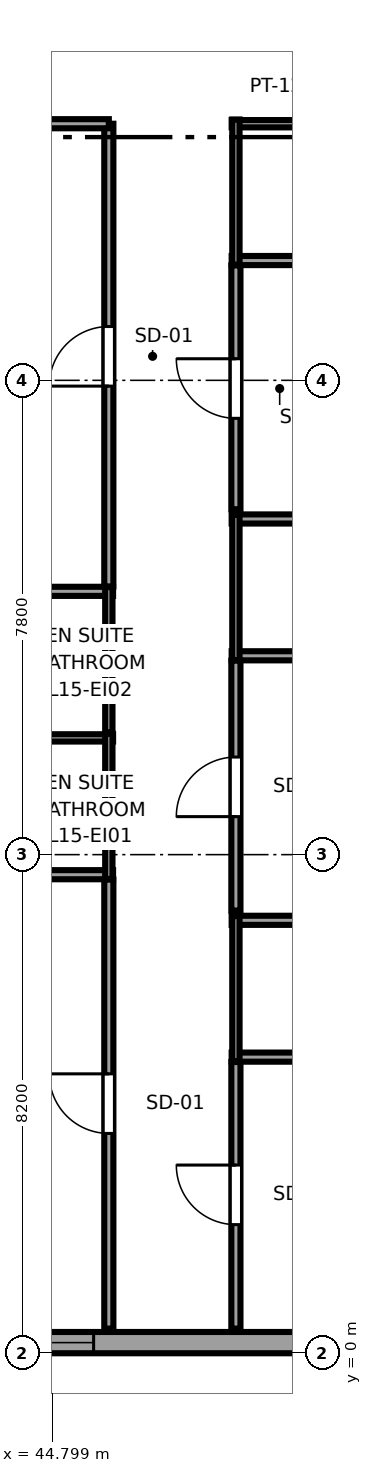
"""IFC4 building model, lengths in metres.
Left out: names, types, materials, properties, quantities, classifications, styles, units other than length and angle.
Written with IfcOpenShell. Run it as: python <this file> out.ifc"""

import sys

from ifc_helpers import new_model, si_unit, direction, frame, frame_2d, origin, place, context, subcontext, project, spatial, rectangle, extrude, source, transform, mapped, element, fill, save


model = new_model("IFC4")
c1 = context("Model", 3, precision=1e-05, world=origin(), true_north=direction((0.0, 1.0)))
c2 = subcontext(c1, "Body", "Model", "MODEL_VIEW")
j1 = project(units=[si_unit("LENGTHUNIT", "METRE"), si_unit("PLANEANGLEUNIT", "RADIAN")], contexts=[c1])
p1 = place(None, origin())
s1 = spatial("IfcSite", under=j1, at=p1, CompositionType="ELEMENT")
p2 = place(p1, origin())
s2 = spatial("IfcBuilding", under=s1, at=p2, CompositionType="ELEMENT")
p3 = place(p2, frame((0.0, 0.0, 63.95)))
s3 = spatial("IfcBuildingStorey", under=s2, at=p3, CompositionType="ELEMENT", Elevation=63.95)
p4 = place(p3, frame((34.375, 0.175, 0.0), z_axis=(0.0, 0.0, 1.0), x_axis=(1.0, 0.0, 0.0)))
e1 = element("IfcWall", 1, at=p4, inside=s3, PredefinedType="SOLIDWALL", context=c2, shape_type="SweptSolid", body=[
    extrude(rectangle(XDim=18.008, YDim=0.35, at=frame_2d((9.004, 0.0))), origin(), (0.0, 0.0, 1.0), 3.37),
])
p5 = place(p4, frame((1.651, 0.0, 0.68)))
e2 = element("IfcOpeningElement", 2, at=p5, cuts=e1, PredefinedType="OPENING", context=c2, shape_type="SweptSolid", body=[
    extrude(rectangle(XDim=2.1, YDim=1.9, at=frame_2d((1.05, 0.95))), frame((0.0, 0.185, 0.0), z_axis=(0.0, -1.0, 0.0), x_axis=(1.0, 0.0, 0.0)), (0.0, 0.0, 1.0), 0.37),
])
p6 = place(p4, frame((9.005, 0.0, 0.68)))
e3 = element("IfcOpeningElement", 3, at=p6, cuts=e1, PredefinedType="OPENING", context=c2, shape_type="SweptSolid", body=[
    extrude(rectangle(XDim=2.1, YDim=1.9, at=frame_2d((1.05, 0.95))), frame((0.0, 0.185, 0.0), z_axis=(0.0, -1.0, 0.0), x_axis=(1.0, 0.0, 0.0)), (0.0, 0.0, 1.0), 0.37),
])
p7 = place(p3, frame((43.21, 7.87, 0.0), z_axis=(0.0, 0.0, 1.0), x_axis=(1.0, 0.0, 0.0)))
e4 = element("IfcWall", 4, at=p7, inside=s3, PredefinedType="PARTITIONING", context=c2, shape_type="SweptSolid", body=[
    extrude(rectangle(XDim=2.59, YDim=0.15, at=frame_2d((1.295, 0.0))), origin(), (0.0, 0.0, 1.0), 3.37),
])
p8 = place(p3, frame((43.21, 10.12, 0.0), z_axis=(0.0, 0.0, 1.0), x_axis=(1.0, 0.0, 0.0)))
e5 = element("IfcWall", 5, at=p8, inside=s3, PredefinedType="PLUMBINGWALL", context=c2, shape_type="SweptSolid", body=[
    extrude(rectangle(XDim=2.59, YDim=0.12, at=frame_2d((1.295, 0.0))), origin(), (0.0, 0.0, 1.0), 3.37),
])
p9 = place(p3, frame((45.73, 7.8, 0.0), z_axis=(0.0, 0.0, 1.0), x_axis=(0.0, 1.0, 0.0)))
e6 = element("IfcWall", 6, at=p9, inside=s3, PredefinedType="PLUMBINGWALL", context=c2, shape_type="SweptSolid", body=[
    extrude(rectangle(XDim=2.39, YDim=0.12, at=frame_2d((1.195, 0.0))), origin(), (0.0, 0.0, 1.0), 2.954),
])
p10 = place(p3, frame((43.21, 12.53, 0.0), z_axis=(0.0, 0.0, 1.0), x_axis=(1.0, 0.0, 0.0)))
e7 = element("IfcWall", 7, at=p10, inside=s3, PredefinedType="PARTITIONING", context=c2, shape_type="SweptSolid", body=[
    extrude(rectangle(XDim=2.59, YDim=0.15, at=frame_2d((1.295, 0.0))), origin(), (0.0, 0.0, 1.0), 3.37),
])
p11 = place(p3, frame((45.73, 10.21, 0.0), z_axis=(0.0, 0.0, 1.0), x_axis=(0.0, 1.0, 0.0)))
e8 = element("IfcWall", 8, at=p11, inside=s3, PredefinedType="PLUMBINGWALL", context=c2, shape_type="SweptSolid", body=[
    extrude(rectangle(XDim=2.39, YDim=0.12, at=frame_2d((1.195, 0.0))), origin(), (0.0, 0.0, 1.0), 2.954),
])
for number, where, z_axis, x_axis in (
    (9, (47.75, 4.87, 0.0), (0.0, 0.0, 1.0), (1.0, 0.0, 0.0)),
    (10, (47.75, 7.12, 0.0), (0.0, 0.0, 1.0), (1.0, 0.0, 0.0)),
):
    element("IfcWall", number, at=place(p3, frame(where, z_axis=z_axis, x_axis=x_axis)), inside=s3, PredefinedType="PARTITIONING", context=c2, shape_type="SweptSolid", body=[
        extrude(rectangle(XDim=2.59, YDim=0.15, at=frame_2d((1.295, 0.0))), origin(), (0.0, 0.0, 1.0), 3.37),
    ])
p12 = place(p3, frame((47.82, 4.8, 0.0), z_axis=(0.0, 0.0, 1.0), x_axis=(0.0, 1.0, 0.0)))
e11 = element("IfcWall", 11, at=p12, inside=s3, PredefinedType="PLUMBINGWALL", context=c2, shape_type="SweptSolid", body=[
    extrude(rectangle(XDim=2.39, YDim=0.12, at=frame_2d((1.195, 0.0))), origin(), (0.0, 0.0, 1.0), 3.37),
])
for number, where, z_axis, x_axis in (
    (12, (47.75, 11.47, 0.0), (0.0, 0.0, 1.0), (1.0, 0.0, 0.0)),
    (13, (47.75, 13.72, 0.0), (0.0, 0.0, 1.0), (1.0, 0.0, 0.0)),
):
    element("IfcWall", number, at=place(p3, frame(where, z_axis=z_axis, x_axis=x_axis)), inside=s3, PredefinedType="PARTITIONING", context=c2, shape_type="SweptSolid", body=[
        extrude(rectangle(XDim=2.59, YDim=0.15, at=frame_2d((1.295, 0.0))), origin(), (0.0, 0.0, 1.0), 3.37),
    ])
p13 = place(p3, frame((47.82, 11.4, 0.0), z_axis=(0.0, 0.0, 1.0), x_axis=(0.0, 1.0, 0.0)))
e14 = element("IfcWall", 14, at=p13, inside=s3, PredefinedType="PLUMBINGWALL", context=c2, shape_type="SweptSolid", body=[
    extrude(rectangle(XDim=2.39, YDim=0.12, at=frame_2d((1.195, 0.0))), origin(), (0.0, 0.0, 1.0), 3.37),
])
p14 = place(p3, frame((47.75, 17.97, 0.0), z_axis=(0.0, 0.0, 1.0), x_axis=(1.0, 0.0, 0.0)))
e15 = element("IfcWall", 15, at=p14, inside=s3, PredefinedType="PARTITIONING", context=c2, shape_type="SweptSolid", body=[
    extrude(rectangle(XDim=2.59, YDim=0.15, at=frame_2d((1.295, 0.0))), origin(), (0.0, 0.0, 1.0), 3.37),
])
p15 = place(p3, frame((47.75, 20.22, 0.0), z_axis=(0.0, 0.0, 1.0), x_axis=(1.0, 0.0, 0.0)))
e16 = element("IfcWall", 16, at=p15, inside=s3, PredefinedType="PLUMBINGWALL", context=c2, shape_type="SweptSolid", body=[
    extrude(rectangle(XDim=2.59, YDim=0.12, at=frame_2d((1.295, 0.0))), origin(), (0.0, 0.0, 1.0), 3.37),
])
p16 = place(p3, frame((47.82, 17.9, 0.0), z_axis=(0.0, 0.0, 1.0), x_axis=(0.0, 1.0, 0.0)))
e17 = element("IfcWall", 17, at=p16, inside=s3, PredefinedType="PLUMBINGWALL", context=c2, shape_type="SweptSolid", body=[
    extrude(rectangle(XDim=2.39, YDim=0.12, at=frame_2d((1.195, 0.0))), origin(), (0.0, 0.0, 1.0), 3.37),
])
p17 = place(p3, frame((45.73, 0.405, 0.0), z_axis=(0.0, 0.0, 1.0), x_axis=(0.0, 1.0, 0.0)))
e18 = element("IfcWall", 18, at=p17, inside=s3, PredefinedType="PARTITIONING", context=c2, shape_type="SweptSolid", body=[
    extrude(rectangle(XDim=7.385, YDim=0.15, at=frame_2d((3.692, 0.0))), origin(), (0.0, 0.0, 1.0), 3.37),
])
p18 = place(p17, frame((3.21, 0.0, 0.0)))
e19 = element("IfcOpeningElement", 19, at=p18, cuts=e18, PredefinedType="OPENING", context=c2, shape_type="SweptSolid", body=[
    extrude(rectangle(XDim=0.98, YDim=2.12, at=frame_2d((0.49, 1.06))), frame((0.0, 0.085, 0.0), z_axis=(0.0, -1.0, 0.0), x_axis=(1.0, 0.0, 0.0)), (0.0, 0.0, 1.0), 0.17),
])
p19 = place(p3, frame((45.73, 12.61, 0.0), z_axis=(0.0, 0.0, 1.0), x_axis=(0.0, 1.0, 0.0)))
e20 = element("IfcWall", 20, at=p19, inside=s3, PredefinedType="PARTITIONING", context=c2, shape_type="SweptSolid", body=[
    extrude(rectangle(XDim=7.61, YDim=0.15, at=frame_2d((3.805, 0.0))), origin(), (0.0, 0.0, 1.0), 2.954),
])
p20 = place(p19, frame((3.295, 0.0, 0.0)))
e21 = element("IfcOpeningElement", 21, at=p20, cuts=e20, PredefinedType="OPENING", context=c2, shape_type="SweptSolid", body=[
    extrude(rectangle(XDim=0.98, YDim=2.12, at=frame_2d((0.49, 1.06))), frame((0.0, 0.085, 0.0), z_axis=(0.0, -1.0, 0.0), x_axis=(1.0, 0.0, 0.0)), (0.0, 0.0, 1.0), 0.17),
])
p21 = place(p3, frame((34.65, 20.22, 0.0), z_axis=(0.0, 0.0, 1.0), x_axis=(1.0, 0.0, 0.0)))
e22 = element("IfcWall", 22, at=p21, inside=s3, PredefinedType="PARTITIONING", context=c2, shape_type="SweptSolid", body=[
    extrude(rectangle(XDim=11.08, YDim=0.15, at=frame_2d((5.54, 0.0))), origin(), (0.0, 0.0, 1.0), 2.954),
])
p22 = place(p3, frame((47.82, 0.405, 0.0), z_axis=(0.0, 0.0, 1.0), x_axis=(0.0, 1.0, 0.0)))
e23 = element("IfcWall", 23, at=p22, inside=s3, PredefinedType="PARTITIONING", context=c2, shape_type="SweptSolid", body=[
    extrude(rectangle(XDim=4.385, YDim=0.15, at=frame_2d((2.192, 0.0))), origin(), (0.0, 0.0, 1.0), 3.37),
])
p23 = place(p22, frame((1.71, 0.0, 0.0)))
e24 = element("IfcOpeningElement", 24, at=p23, cuts=e23, PredefinedType="OPENING", context=c2, shape_type="SweptSolid", body=[
    extrude(rectangle(XDim=0.98, YDim=2.12, at=frame_2d((0.49, 1.06))), frame((0.0, 0.085, 0.0), z_axis=(0.0, -1.0, 0.0), x_axis=(1.0, 0.0, 0.0)), (0.0, 0.0, 1.0), 0.17),
])
p24 = place(p3, frame((47.82, 7.28, 0.0), z_axis=(0.0, 0.0, 1.0), x_axis=(0.0, 1.0, 0.0)))
e25 = element("IfcWall", 25, at=p24, inside=s3, PredefinedType="PARTITIONING", context=c2, shape_type="SweptSolid", body=[
    extrude(rectangle(XDim=4.11, YDim=0.15, at=frame_2d((2.055, 0.0))), origin(), (0.0, 0.0, 1.0), 3.37),
])
p25 = place(p24, frame((1.545, 0.0, 0.0)))
e26 = element("IfcOpeningElement", 26, at=p25, cuts=e25, PredefinedType="OPENING", context=c2, shape_type="SweptSolid", body=[
    extrude(rectangle(XDim=0.98, YDim=2.12, at=frame_2d((0.49, 1.06))), frame((0.0, 0.085, 0.0), z_axis=(0.0, -1.0, 0.0), x_axis=(1.0, 0.0, 0.0)), (0.0, 0.0, 1.0), 0.17),
])
p26 = place(p3, frame((47.82, 13.88, 0.0), z_axis=(0.0, 0.0, 1.0), x_axis=(0.0, 1.0, 0.0)))
e27 = element("IfcWall", 27, at=p26, inside=s3, PredefinedType="PARTITIONING", context=c2, shape_type="SweptSolid", body=[
    extrude(rectangle(XDim=4.01, YDim=0.15, at=frame_2d((2.005, 0.0))), origin(), (0.0, 0.0, 1.0), 3.37),
])
p27 = place(p26, frame((1.495, 0.0, 0.0)))
e28 = element("IfcOpeningElement", 28, at=p27, cuts=e27, PredefinedType="OPENING", context=c2, shape_type="SweptSolid", body=[
    extrude(rectangle(XDim=0.98, YDim=2.12, at=frame_2d((0.49, 1.06))), frame((0.0, 0.085, 0.0), z_axis=(0.0, -1.0, 0.0), x_axis=(1.0, 0.0, 0.0)), (0.0, 0.0, 1.0), 0.17),
])
m1 = source(origin(), c2, "Body", "SweptSolid", [
    extrude(rectangle(XDim=2.1, YDim=1.9, at=frame_2d((1.05, 0.95))), frame((0.0, 0.09, 0.0), z_axis=(0.0, -1.0, 0.0), x_axis=(1.0, 0.0, 0.0)), (0.0, 0.0, 1.0), 0.06),
])
p28 = place(p6, origin())
e29 = element("IfcWindow", 29, at=p28, inside=s3, PartitioningType="TRIPLE_PANEL_HORIZONTAL", PredefinedType="WINDOW", context=c2, shape_type="MappedRepresentation", body=[
    mapped(m1, transform((0.0, 0.0, 0.0), x_axis=(1.0, 0.0, 0.0), y_axis=(0.0, 1.0, 0.0), z_axis=(0.0, 0.0, 1.0), scale=1.0)),
])
fill(e3, e29)
m2 = source(origin(), c2, "Body", "SweptSolid", [
    extrude(rectangle(XDim=0.98, YDim=2.12, at=frame_2d((0.49, 1.06))), frame((0.0, 0.025, 0.0), z_axis=(0.0, -1.0, 0.0), x_axis=(1.0, 0.0, 0.0)), (0.0, 0.0, 1.0), 0.05),
])
p29 = place(p18, origin())
e30 = element("IfcDoor", 30, at=p29, inside=s3, OperationType="SINGLE_SWING_RIGHT", PredefinedType="DOOR", context=c2, shape_type="MappedRepresentation", body=[
    mapped(m2, transform((0.0, 0.0, 0.0), x_axis=(1.0, 0.0, 0.0), y_axis=(0.0, 1.0, 0.0), z_axis=(0.0, 0.0, 1.0), scale=1.0)),
])
fill(e19, e30)
p30 = place(p20, origin())
e31 = element("IfcDoor", 31, at=p30, inside=s3, OperationType="SINGLE_SWING_LEFT", PredefinedType="DOOR", context=c2, shape_type="MappedRepresentation", body=[
    mapped(m2, transform((0.0, 0.0, 0.0), x_axis=(1.0, 0.0, 0.0), y_axis=(0.0, 1.0, 0.0), z_axis=(0.0, 0.0, 1.0), scale=1.0)),
])
fill(e21, e31)
p31 = place(p23, origin())
e32 = element("IfcDoor", 32, at=p31, inside=s3, OperationType="SINGLE_SWING_RIGHT", PredefinedType="DOOR", context=c2, shape_type="MappedRepresentation", body=[
    mapped(m2, transform((0.0, 0.0, 0.0), x_axis=(1.0, 0.0, 0.0), y_axis=(0.0, 1.0, 0.0), z_axis=(0.0, 0.0, 1.0), scale=1.0)),
])
fill(e24, e32)
p32 = place(p25, origin())
e33 = element("IfcDoor", 33, at=p32, inside=s3, OperationType="SINGLE_SWING_LEFT", PredefinedType="DOOR", context=c2, shape_type="MappedRepresentation", body=[
    mapped(m2, transform((0.0, 0.0, 0.0), x_axis=(1.0, 0.0, 0.0), y_axis=(0.0, 1.0, 0.0), z_axis=(0.0, 0.0, 1.0), scale=1.0)),
])
fill(e26, e33)
p33 = place(p27, origin())
e34 = element("IfcDoor", 34, at=p33, inside=s3, OperationType="SINGLE_SWING_RIGHT", PredefinedType="DOOR", context=c2, shape_type="MappedRepresentation", body=[
    mapped(m2, transform((0.0, 0.0, 0.0), x_axis=(1.0, 0.0, 0.0), y_axis=(0.0, 1.0, 0.0), z_axis=(0.0, 0.0, 1.0), scale=1.0)),
])
fill(e28, e34)
save(model, sys.argv[1])
